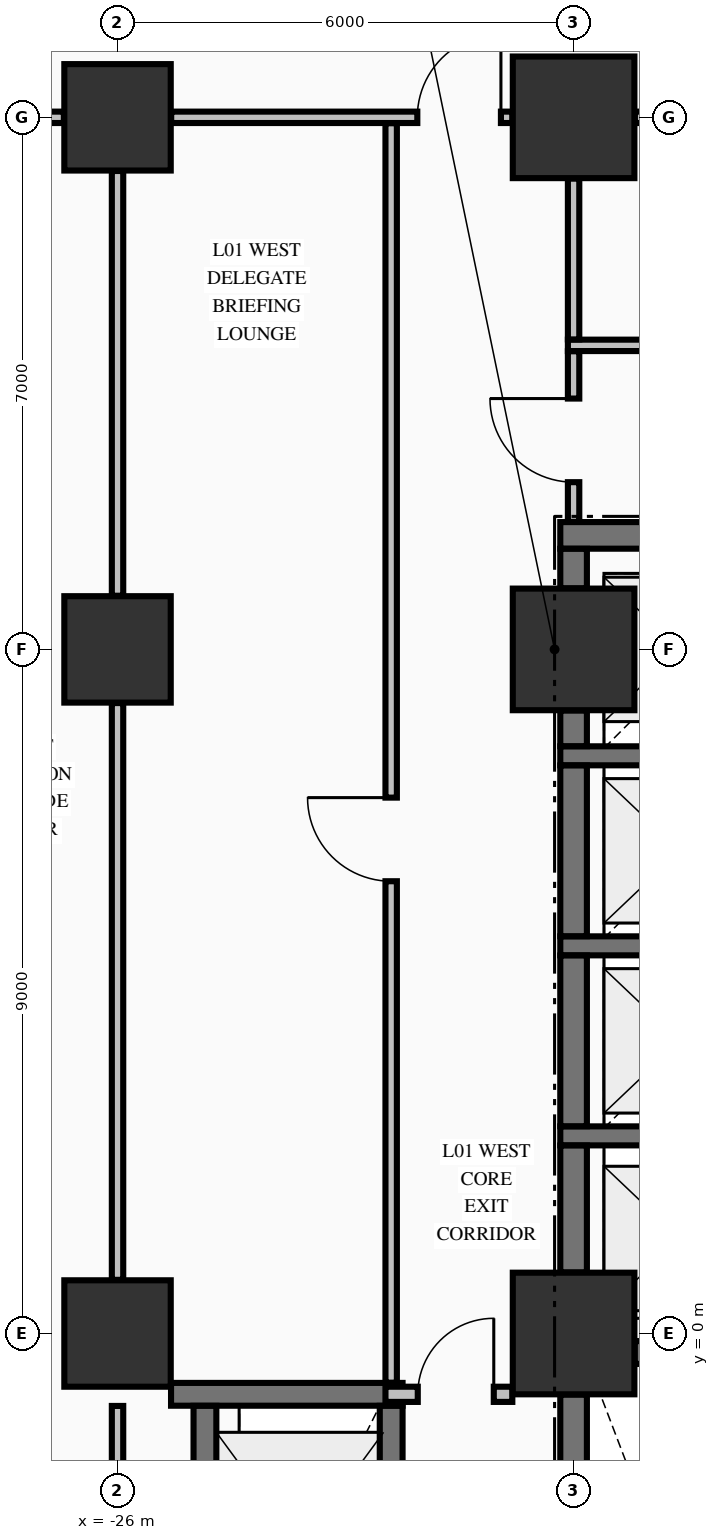
"""IFC4 building model, lengths in metres.
Left out: names, types, materials, properties, quantities, classifications, styles, units other than length and angle.
Written with IfcOpenShell. Run it as: python <this file> out.ifc"""

import sys

from ifc_helpers import new_model, si_unit, direction, frame, frame_2d, origin, origin_2d, place, context, subcontext, project, spatial, rectangle, extrude, element, fill, save


model = new_model("IFC4")
c1 = context("Model", 3, precision=1e-05, world=origin(), true_north=direction((0.0, 1.0)))
c2 = subcontext(c1, "Body", "Model", "MODEL_VIEW")
j1 = project(units=[si_unit("LENGTHUNIT", "METRE"), si_unit("PLANEANGLEUNIT", "RADIAN")], contexts=[c1])
p1 = place(None, origin())
s1 = spatial("IfcSite", under=j1, at=p1, CompositionType="ELEMENT")
p2 = place(p1, origin())
s2 = spatial("IfcBuilding", under=s1, at=p2, CompositionType="ELEMENT")
p3 = place(p2, frame((0.0, 0.0, 5.44)))
s3 = spatial("IfcBuildingStorey", under=s2, at=p3, CompositionType="ELEMENT", Elevation=5.44)
for number, where, z_axis, x_axis in (
    (1, (-26.0, 0.0, 0.0), (0.0, 0.0, 1.0), (1.0, 0.0, 0.0)),
    (2, (-26.0, 9.0, 0.0), (0.0, 0.0, 1.0), (1.0, 0.0, 0.0)),
    (3, (-26.0, 16.0, 0.0), (0.0, 0.0, 1.0), (1.0, 0.0, 0.0)),
):
    element("IfcColumn", number, at=place(p3, frame(where, z_axis=z_axis, x_axis=x_axis)), inside=s3, PredefinedType="COLUMN", context=c2, shape_type="SweptSolid", body=[
        extrude(rectangle(XDim=1.4, YDim=1.4, at=origin_2d()), origin(), (0.0, 0.0, 1.0), 5.09),
    ])
for number, where, z_axis, x_axis in (
    (4, (-20.0, 0.0, 0.0), (0.0, 0.0, 1.0), (1.0, 0.0, 0.0)),
    (5, (-20.0, 9.0, 0.0), (0.0, 0.0, 1.0), (1.0, 0.0, 0.0)),
    (6, (-20.0, 16.0, 0.0), (0.0, 0.0, 1.0), (1.0, 0.0, 0.0)),
):
    element("IfcColumn", number, at=place(p3, frame(where, z_axis=z_axis, x_axis=x_axis)), inside=s3, PredefinedType="COLUMN", context=c2, shape_type="SweptSolid", body=[
        extrude(rectangle(XDim=1.6, YDim=1.6, at=origin_2d()), origin(), (0.0, 0.0, 1.0), 5.09),
    ])
p4 = place(p3, frame((-25.296, -0.8, 0.0), z_axis=(0.0, 0.0, 1.0), x_axis=(1.0, 0.0, 0.0)))
e7 = element("IfcWall", 7, at=p4, inside=s3, PredefinedType="SHEAR", context=c2, shape_type="SweptSolid", body=[
    extrude(rectangle(XDim=3.046, YDim=0.3, at=frame_2d((1.523, 0.0))), origin(), (0.0, 0.0, 1.0), 5.09),
])
p5 = place(p3, frame((-19.196, -0.25, 0.0), z_axis=(0.0, 0.0, 1.0), x_axis=(1.0, 0.0, 0.0)))
e8 = element("IfcWall", 8, at=p5, inside=s3, PredefinedType="SHEAR", context=c2, shape_type="SweptSolid", body=[
    extrude(rectangle(XDim=7.392, YDim=0.3, at=frame_2d((3.696, 0.0))), origin(), (0.0, 0.0, 1.0), 5.09),
])
p6 = place(p5, frame((5.496, 0.0, 0.0)))
e9 = element("IfcOpeningElement", 9, at=p6, cuts=e8, PredefinedType="OPENING", context=c2, shape_type="SweptSolid", body=[
    extrude(rectangle(XDim=1.1, YDim=2.15, at=frame_2d((0.55, 1.075))), frame((0.0, 0.16, 0.0), z_axis=(0.0, -1.0, 0.0), x_axis=(1.0, 0.0, 0.0)), (0.0, 0.0, 1.0), 0.32),
])
for number, where, z_axis, x_axis in (
    (10, (-20.175, 2.6, 0.0), (0.0, 0.0, 1.0), (1.0, 0.0, 0.0)),
    (11, (-20.175, 5.1, 0.0), (0.0, 0.0, 1.0), (1.0, 0.0, 0.0)),
    (12, (-20.175, 7.6, 0.0), (0.0, 0.0, 1.0), (1.0, 0.0, 0.0)),
):
    element("IfcWall", number, at=place(p3, frame(where, z_axis=z_axis, x_axis=x_axis)), inside=s3, PredefinedType="SOLIDWALL", context=c2, shape_type="SweptSolid", body=[
        extrude(rectangle(XDim=3.1, YDim=0.25, at=frame_2d((1.55, 0.0))), origin(), (0.0, 0.0, 1.0), 5.09),
    ])
p7 = place(p3, frame((-20.175, 10.5, 0.0), z_axis=(0.0, 0.0, 1.0), x_axis=(1.0, 0.0, 0.0)))
e13 = element("IfcWall", 13, at=p7, inside=s3, PredefinedType="SHEAR", context=c2, shape_type="SweptSolid", body=[
    extrude(rectangle(XDim=5.475, YDim=0.35, at=frame_2d((2.738, 0.0))), origin(), (0.0, 0.0, 1.0), 5.09),
])
p8 = place(p7, frame((3.575, 0.0, 0.0)))
e14 = element("IfcOpeningElement", 14, at=p8, cuts=e13, PredefinedType="OPENING", context=c2, shape_type="SweptSolid", body=[
    extrude(rectangle(XDim=1.2, YDim=2.15, at=frame_2d((0.6, 1.075))), frame((0.0, 0.185, 0.0), z_axis=(0.0, -1.0, 0.0), x_axis=(1.0, 0.0, 0.0)), (0.0, 0.0, 1.0), 0.37),
])
p9 = place(p3, frame((-22.475, -0.8, 0.0), z_axis=(0.0, 0.0, 1.0), x_axis=(1.0, 0.0, 0.0)))
e15 = element("IfcWall", 15, at=p9, inside=s3, PredefinedType="PARTITIONING", context=c2, shape_type="SweptSolid", body=[
    extrude(rectangle(XDim=1.669, YDim=0.2, at=frame_2d((0.834, 0.0))), origin(), (0.0, 0.0, 1.0), 5.09),
])
p10 = place(p9, frame((0.425, 0.0, 0.0)))
e16 = element("IfcOpeningElement", 16, at=p10, cuts=e15, PredefinedType="OPENING", context=c2, shape_type="SweptSolid", body=[
    extrude(rectangle(XDim=1.0, YDim=2.15, at=frame_2d((0.5, 1.075))), frame((0.0, 0.11, 0.0), z_axis=(0.0, -1.0, 0.0), x_axis=(1.0, 0.0, 0.0)), (0.0, 0.0, 1.0), 0.22),
])
p11 = place(p3, frame((-20.075, 13.0, 0.0), z_axis=(0.0, 0.0, 1.0), x_axis=(1.0, 0.0, 0.0)))
e17 = element("IfcWall", 17, at=p11, inside=s3, PredefinedType="PARTITIONING", context=c2, shape_type="SweptSolid", body=[
    extrude(rectangle(XDim=11.415, YDim=0.15, at=frame_2d((5.708, 0.0))), origin(), (0.0, 0.0, 1.0), 5.09),
])
p12 = place(p11, frame((9.725, 0.0, 0.0)))
e18 = element("IfcOpeningElement", 18, at=p12, cuts=e17, PredefinedType="OPENING", context=c2, shape_type="SweptSolid", body=[
    extrude(rectangle(XDim=1.1, YDim=2.15, at=frame_2d((0.55, 1.075))), frame((0.0, 0.085, 0.0), z_axis=(0.0, -1.0, 0.0), x_axis=(1.0, 0.0, 0.0)), (0.0, 0.0, 1.0), 0.17),
])
p13 = place(p3, frame((-28.875, 16.0, 0.0), z_axis=(0.0, 0.0, 1.0), x_axis=(1.0, 0.0, 0.0)))
e19 = element("IfcWall", 19, at=p13, inside=s3, PredefinedType="PARTITIONING", context=c2, shape_type="SweptSolid", body=[
    extrude(rectangle(XDim=2.169, YDim=0.15, at=frame_2d((1.084, 0.0))), origin(), (0.0, 0.0, 1.0), 4.132),
])
p14 = place(p13, frame((0.6, 0.0, 0.0)))
e20 = element("IfcOpeningElement", 20, at=p14, cuts=e19, PredefinedType="OPENING", context=c2, shape_type="SweptSolid", body=[
    extrude(rectangle(XDim=1.05, YDim=2.15, at=frame_2d((0.525, 1.075))), frame((0.0, 0.085, 0.0), z_axis=(0.0, -1.0, 0.0), x_axis=(1.0, 0.0, 0.0)), (0.0, 0.0, 1.0), 0.17),
])
p15 = place(p3, frame((-25.294, 16.0, 0.0), z_axis=(0.0, 0.0, 1.0), x_axis=(1.0, 0.0, 0.0)))
e21 = element("IfcWall", 21, at=p15, inside=s3, PredefinedType="PARTITIONING", context=c2, shape_type="SweptSolid", body=[
    extrude(rectangle(XDim=4.488, YDim=0.15, at=frame_2d((2.244, 0.0))), origin(), (0.0, 0.0, 1.0), 4.132),
])
p16 = place(p15, frame((3.238, 0.0, 0.0)))
e22 = element("IfcOpeningElement", 22, at=p16, cuts=e21, PredefinedType="OPENING", context=c2, shape_type="SweptSolid", body=[
    extrude(rectangle(XDim=1.1, YDim=2.15, at=frame_2d((0.55, 1.075))), frame((0.0, 0.085, 0.0), z_axis=(0.0, -1.0, 0.0), x_axis=(1.0, 0.0, 0.0)), (0.0, 0.0, 1.0), 0.17),
])
p17 = place(p3, frame((-19.194, 16.0, 0.0), z_axis=(0.0, 0.0, 1.0), x_axis=(1.0, 0.0, 0.0)))
e23 = element("IfcWall", 23, at=p17, inside=s3, PredefinedType="PARTITIONING", context=c2, shape_type="SweptSolid", body=[
    extrude(rectangle(XDim=7.388, YDim=0.15, at=frame_2d((3.694, 0.0))), origin(), (0.0, 0.0, 1.0), 4.132),
])
p18 = place(p17, frame((3.144, 0.0, 0.0)))
e24 = element("IfcOpeningElement", 24, at=p18, cuts=e23, PredefinedType="OPENING", context=c2, shape_type="SweptSolid", body=[
    extrude(rectangle(XDim=1.1, YDim=2.15, at=frame_2d((0.55, 1.075))), frame((0.0, 0.085, 0.0), z_axis=(0.0, -1.0, 0.0), x_axis=(1.0, 0.0, 0.0)), (0.0, 0.0, 1.0), 0.17),
])
p19 = place(p3, frame((-24.85, -4.648, 0.0), z_axis=(0.0, 0.0, 1.0), x_axis=(0.0, 1.0, 0.0)))
e25 = element("IfcWall", 25, at=p19, inside=s3, PredefinedType="SHEAR", context=c2, shape_type="SweptSolid", body=[
    extrude(rectangle(XDim=3.696, YDim=0.3, at=frame_2d((1.848, 0.0))), origin(), (0.0, 0.0, 1.0), 5.09),
])
p20 = place(p3, frame((-22.4, -4.648, 0.0), z_axis=(0.0, 0.0, 1.0), x_axis=(0.0, 1.0, 0.0)))
e26 = element("IfcWall", 26, at=p20, inside=s3, PredefinedType="SHEAR", context=c2, shape_type="SweptSolid", body=[
    extrude(rectangle(XDim=3.696, YDim=0.3, at=frame_2d((1.848, 0.0))), origin(), (0.0, 0.0, 1.0), 5.09),
])
p21 = place(p20, frame((1.198, 0.0, 0.0)))
e27 = element("IfcOpeningElement", 27, at=p21, cuts=e26, PredefinedType="OPENING", context=c2, shape_type="SweptSolid", body=[
    extrude(rectangle(XDim=1.3, YDim=2.3, at=frame_2d((0.65, 1.15))), frame((0.0, 0.16, 0.0), z_axis=(0.0, -1.0, 0.0), x_axis=(1.0, 0.0, 0.0)), (0.0, 0.0, 1.0), 0.32),
])
p22 = place(p3, frame((-20.0, -8.196, 0.0), z_axis=(0.0, 0.0, 1.0), x_axis=(0.0, 1.0, 0.0)))
e28 = element("IfcWall", 28, at=p22, inside=s3, PredefinedType="SHEAR", context=c2, shape_type="SweptSolid", body=[
    extrude(rectangle(XDim=7.392, YDim=0.35, at=frame_2d((3.696, 0.0))), origin(), (0.0, 0.0, 1.0), 5.09),
])
p23 = place(p3, frame((-20.0, 0.804, 0.0), z_axis=(0.0, 0.0, 1.0), x_axis=(0.0, 1.0, 0.0)))
e29 = element("IfcWall", 29, at=p23, inside=s3, PredefinedType="SHEAR", context=c2, shape_type="SweptSolid", body=[
    extrude(rectangle(XDim=1.669, YDim=0.35, at=frame_2d((0.834, 0.0))), origin(), (0.0, 0.0, 1.0), 5.09),
])
for number, where, z_axis, x_axis in (
    (30, (-20.0, 2.727, 0.0), (0.0, 0.0, 1.0), (0.0, 1.0, 0.0)),
    (31, (-20.0, 5.227, 0.0), (0.0, 0.0, 1.0), (0.0, 1.0, 0.0)),
):
    element("IfcWall", number, at=place(p3, frame(where, z_axis=z_axis, x_axis=x_axis)), inside=s3, PredefinedType="SHEAR", context=c2, shape_type="SweptSolid", body=[
        extrude(rectangle(XDim=2.246, YDim=0.35, at=frame_2d((1.123, 0.0))), origin(), (0.0, 0.0, 1.0), 5.09),
    ])
p24 = place(p3, frame((-20.0, 7.727, 0.0), z_axis=(0.0, 0.0, 1.0), x_axis=(0.0, 1.0, 0.0)))
e32 = element("IfcWall", 32, at=p24, inside=s3, PredefinedType="SHEAR", context=c2, shape_type="SweptSolid", body=[
    extrude(rectangle(XDim=0.469, YDim=0.35, at=frame_2d((0.234, 0.0))), origin(), (0.0, 0.0, 1.0), 5.09),
])
p25 = place(p3, frame((-20.0, 9.804, 0.0), z_axis=(0.0, 0.0, 1.0), x_axis=(0.0, 1.0, 0.0)))
e33 = element("IfcWall", 33, at=p25, inside=s3, PredefinedType="SHEAR", context=c2, shape_type="SweptSolid", body=[
    extrude(rectangle(XDim=0.519, YDim=0.35, at=frame_2d((0.26, 0.0))), origin(), (0.0, 0.0, 1.0), 5.09),
])
p26 = place(p3, frame((-26.0, -8.294, 0.0), z_axis=(0.0, 0.0, 1.0), x_axis=(0.0, 1.0, 0.0)))
e34 = element("IfcWall", 34, at=p26, inside=s3, PredefinedType="PARTITIONING", context=c2, shape_type="SweptSolid", body=[
    extrude(rectangle(XDim=7.341, YDim=0.15, at=frame_2d((3.67, 0.0))), origin(), (0.0, 0.0, 1.0), 4.132),
])
p27 = place(p3, frame((-26.0, 0.706, 0.0), z_axis=(0.0, 0.0, 1.0), x_axis=(0.0, 1.0, 0.0)))
e35 = element("IfcWall", 35, at=p27, inside=s3, PredefinedType="PARTITIONING", context=c2, shape_type="SweptSolid", body=[
    extrude(rectangle(XDim=7.588, YDim=0.15, at=frame_2d((3.794, 0.0))), origin(), (0.0, 0.0, 1.0), 4.132),
])
p28 = place(p3, frame((-26.0, 9.706, 0.0), z_axis=(0.0, 0.0, 1.0), x_axis=(0.0, 1.0, 0.0)))
e36 = element("IfcWall", 36, at=p28, inside=s3, PredefinedType="PARTITIONING", context=c2, shape_type="SweptSolid", body=[
    extrude(rectangle(XDim=5.588, YDim=0.15, at=frame_2d((2.794, 0.0))), origin(), (0.0, 0.0, 1.0), 4.132),
])
p29 = place(p3, frame((-22.4, -0.647, 0.0), z_axis=(0.0, 0.0, 1.0), x_axis=(0.0, 1.0, 0.0)))
e37 = element("IfcWall", 37, at=p29, inside=s3, PredefinedType="PARTITIONING", context=c2, shape_type="SweptSolid", body=[
    extrude(rectangle(XDim=16.569, YDim=0.15, at=frame_2d((8.285, 0.0))), origin(), (0.0, 0.0, 1.0), 5.09),
])
p30 = place(p29, frame((6.597, 0.0, 0.0)))
e38 = element("IfcOpeningElement", 38, at=p30, cuts=e37, PredefinedType="OPENING", context=c2, shape_type="SweptSolid", body=[
    extrude(rectangle(XDim=1.1, YDim=2.15, at=frame_2d((0.55, 1.075))), frame((0.0, 0.085, 0.0), z_axis=(0.0, -1.0, 0.0), x_axis=(1.0, 0.0, 0.0)), (0.0, 0.0, 1.0), 0.17),
])
p31 = place(p3, frame((-20.0, 10.678, 0.0), z_axis=(0.0, 0.0, 1.0), x_axis=(0.0, 1.0, 0.0)))
e39 = element("IfcWall", 39, at=p31, inside=s3, PredefinedType="PARTITIONING", context=c2, shape_type="SweptSolid", body=[
    extrude(rectangle(XDim=2.244, YDim=0.15, at=frame_2d((1.122, 0.0))), origin(), (0.0, 0.0, 1.0), 4.132),
])
p32 = place(p31, frame((0.522, 0.0, 0.0)))
e40 = element("IfcOpeningElement", 40, at=p32, cuts=e39, PredefinedType="OPENING", context=c2, shape_type="SweptSolid", body=[
    extrude(rectangle(XDim=1.1, YDim=2.15, at=frame_2d((0.55, 1.075))), frame((0.0, 0.085, 0.0), z_axis=(0.0, -1.0, 0.0), x_axis=(1.0, 0.0, 0.0)), (0.0, 0.0, 1.0), 0.17),
])
p33 = place(p3, frame((-20.0, 13.078, 0.0), z_axis=(0.0, 0.0, 1.0), x_axis=(0.0, 1.0, 0.0)))
e41 = element("IfcWall", 41, at=p33, inside=s3, PredefinedType="PARTITIONING", context=c2, shape_type="SweptSolid", body=[
    extrude(rectangle(XDim=2.116, YDim=0.15, at=frame_2d((1.058, 0.0))), origin(), (0.0, 0.0, 1.0), 4.132),
])
p34 = place(p10, origin())
e42 = element("IfcDoor", 42, at=p34, inside=s3, OperationType="SINGLE_SWING_RIGHT", PredefinedType="DOOR", context=c2, shape_type="SweptSolid", body=[
    extrude(rectangle(XDim=1.0, YDim=2.15, at=frame_2d((0.5, 1.075))), frame((0.0, 0.025, 0.0), z_axis=(0.0, -1.0, 0.0), x_axis=(1.0, 0.0, 0.0)), (0.0, 0.0, 1.0), 0.05),
])
fill(e16, e42)
p35 = place(p30, origin())
e43 = element("IfcDoor", 43, at=p35, inside=s3, OperationType="SINGLE_SWING_RIGHT", PredefinedType="DOOR", context=c2, shape_type="SweptSolid", body=[
    extrude(rectangle(XDim=1.1, YDim=2.15, at=frame_2d((0.55, 1.075))), frame((0.0, 0.025, 0.0), z_axis=(0.0, -1.0, 0.0), x_axis=(1.0, 0.0, 0.0)), (0.0, 0.0, 1.0), 0.05),
])
fill(e38, e43)
p36 = place(p16, origin())
e44 = element("IfcDoor", 44, at=p36, inside=s3, OperationType="SINGLE_SWING_RIGHT", PredefinedType="DOOR", context=c2, shape_type="SweptSolid", body=[
    extrude(rectangle(XDim=1.1, YDim=2.15, at=frame_2d((0.55, 1.075))), frame((0.0, 0.025, 0.0), z_axis=(0.0, -1.0, 0.0), x_axis=(1.0, 0.0, 0.0)), (0.0, 0.0, 1.0), 0.05),
])
fill(e22, e44)
p37 = place(p32, origin())
e45 = element("IfcDoor", 45, at=p37, inside=s3, OperationType="SINGLE_SWING_RIGHT", PredefinedType="DOOR", context=c2, shape_type="SweptSolid", body=[
    extrude(rectangle(XDim=1.1, YDim=2.15, at=frame_2d((0.55, 1.075))), frame((0.0, 0.025, 0.0), z_axis=(0.0, -1.0, 0.0), x_axis=(1.0, 0.0, 0.0)), (0.0, 0.0, 1.0), 0.05),
])
fill(e40, e45)
save(model, sys.argv[1])
